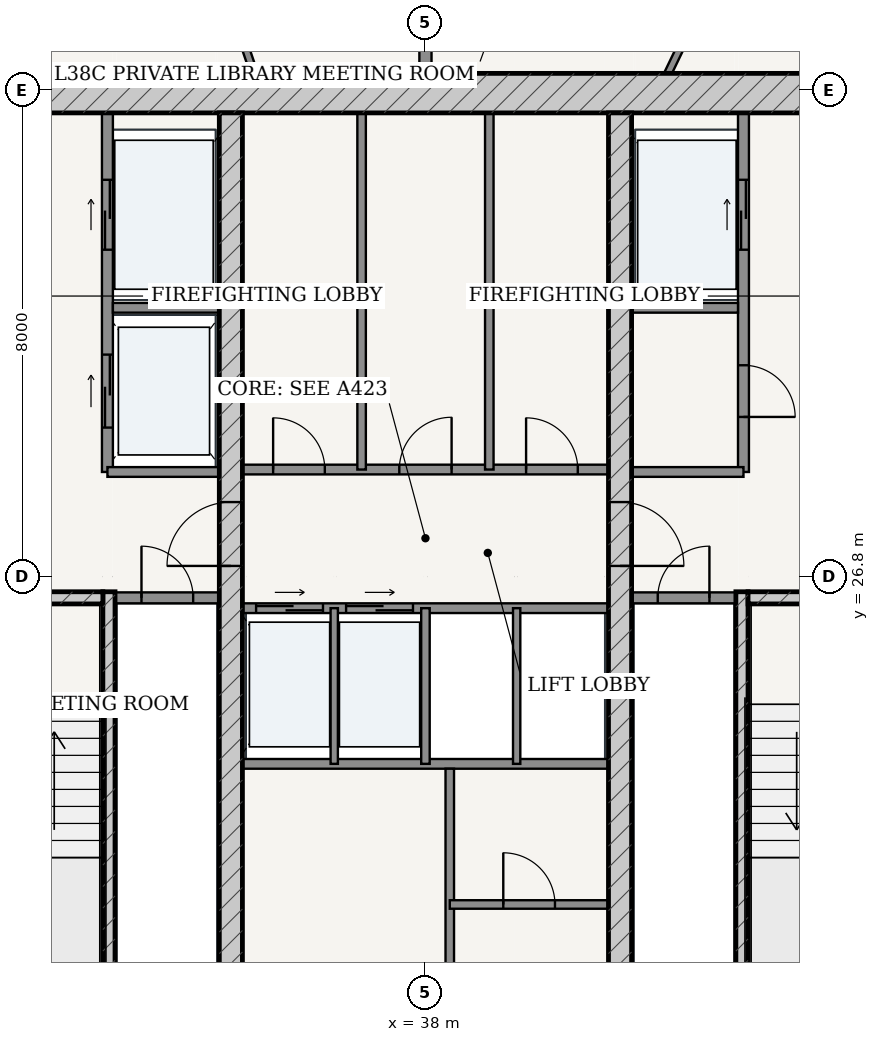
"""IFC4 building model, lengths in metres.
Left out: names, types, materials, properties, quantities, classifications, styles, units other than length and angle.
Written with IfcOpenShell. Run it as: python <this file> out.ifc"""

import sys

from ifc_helpers import new_model, si_unit, direction, frame, frame_2d, origin, place, context, subcontext, project, spatial, rectangle, extrude, source, transform, mapped, element, fill, save


model = new_model("IFC4")
c1 = context("Model", 3, precision=1e-05, world=origin(), true_north=direction((-0.2419218956, 0.970295726276)))
c2 = subcontext(c1, "Body", "Model", "MODEL_VIEW")
j1 = project(units=[si_unit("LENGTHUNIT", "METRE"), si_unit("PLANEANGLEUNIT", "RADIAN")], contexts=[c1])
p1 = place(None, origin())
s1 = spatial("IfcSite", under=j1, at=p1, CompositionType="ELEMENT")
p2 = place(p1, origin())
s2 = spatial("IfcBuilding", under=s1, at=p2, CompositionType="ELEMENT")
p3 = place(p2, frame((0.0, 0.0, 146.2)))
s3 = spatial("IfcBuildingStorey", under=s2, at=p3, CompositionType="ELEMENT", Elevation=146.2)
p4 = place(p3, frame((28.725, 34.75, 0.0), z_axis=(0.0, 0.0, 1.0), x_axis=(1.0, 0.0, 0.0)))
e1 = element("IfcWall", 1, at=p4, inside=s3, PredefinedType="SHEAR", context=c2, shape_type="SweptSolid", body=[
    extrude(rectangle(XDim=18.55, YDim=0.65, at=frame_2d((9.275, 0.0))), origin(), (0.0, 0.0, 1.0), 3.33),
])
p5 = place(p3, frame((32.795, 19.175, 0.0), z_axis=(0.0, 0.0, 1.0), x_axis=(0.0, 1.0, 0.0)))
e2 = element("IfcWall", 2, at=p5, inside=s3, PredefinedType="SOLIDWALL", context=c2, shape_type="SweptSolid", body=[
    extrude(rectangle(XDim=7.375, YDim=0.2, at=frame_2d((3.688, 0.0))), origin(), (0.0, 0.0, 1.0), 3.33),
])
p6 = place(p3, frame((29.375, 26.45, 0.0), z_axis=(0.0, 0.0, 1.0), x_axis=(1.0, 0.0, 0.0)))
e3 = element("IfcWall", 3, at=p6, inside=s3, PredefinedType="SOLIDWALL", context=c2, shape_type="SweptSolid", body=[
    extrude(rectangle(XDim=3.32, YDim=0.2, at=frame_2d((1.66, 0.0))), origin(), (0.0, 0.0, 1.0), 3.33),
])
p7 = place(p6, frame((1.185, 0.0, 0.0)))
e4 = element("IfcOpeningElement", 4, at=p7, cuts=e3, PredefinedType="OPENING", context=c2, shape_type="SweptSolid", body=[
    extrude(rectangle(XDim=0.95, YDim=2.15, at=frame_2d((0.475, 1.075))), frame((0.0, 0.11, 0.0), z_axis=(0.0, -1.0, 0.0), x_axis=(1.0, 0.0, 0.0)), (0.0, 0.0, 1.0), 0.22),
])
p8 = place(p3, frame((43.205, 19.175, 0.0), z_axis=(0.0, 0.0, 1.0), x_axis=(0.0, 1.0, 0.0)))
e5 = element("IfcWall", 5, at=p8, inside=s3, PredefinedType="SOLIDWALL", context=c2, shape_type="SweptSolid", body=[
    extrude(rectangle(XDim=7.375, YDim=0.2, at=frame_2d((3.688, 0.0))), origin(), (0.0, 0.0, 1.0), 3.33),
])
p9 = place(p3, frame((43.305, 26.45, 0.0), z_axis=(0.0, 0.0, 1.0), x_axis=(1.0, 0.0, 0.0)))
e6 = element("IfcWall", 6, at=p9, inside=s3, PredefinedType="SOLIDWALL", context=c2, shape_type="SweptSolid", body=[
    extrude(rectangle(XDim=3.32, YDim=0.2, at=frame_2d((1.66, 0.0))), origin(), (0.0, 0.0, 1.0), 3.33),
])
p10 = place(p9, frame((1.185, 0.0, 0.0)))
e7 = element("IfcOpeningElement", 7, at=p10, cuts=e6, PredefinedType="OPENING", context=c2, shape_type="SweptSolid", body=[
    extrude(rectangle(XDim=0.95, YDim=2.15, at=frame_2d((0.475, 1.075))), frame((0.0, 0.11, 0.0), z_axis=(0.0, -1.0, 0.0), x_axis=(1.0, 0.0, 0.0)), (0.0, 0.0, 1.0), 0.22),
])
p11 = place(p3, frame((34.8, 19.175, 0.0), z_axis=(0.0, 0.0, 1.0), x_axis=(0.0, 1.0, 0.0)))
e8 = element("IfcWall", 8, at=p11, inside=s3, PredefinedType="SHEAR", context=c2, shape_type="SweptSolid", body=[
    extrude(rectangle(XDim=15.25, YDim=0.38, at=frame_2d((7.625, 0.0))), origin(), (0.0, 0.0, 1.0), 3.33),
])
p12 = place(p11, frame((7.8, 0.0, 0.0)))
e9 = element("IfcOpeningElement", 9, at=p12, cuts=e8, PredefinedType="OPENING", context=c2, shape_type="SweptSolid", body=[
    extrude(rectangle(XDim=1.05, YDim=2.15, at=frame_2d((0.525, 1.075))), frame((0.0, 0.2, 0.0), z_axis=(0.0, -1.0, 0.0), x_axis=(1.0, 0.0, 0.0)), (0.0, 0.0, 1.0), 0.4),
])
p13 = place(p3, frame((41.2, 19.175, 0.0), z_axis=(0.0, 0.0, 1.0), x_axis=(0.0, 1.0, 0.0)))
e10 = element("IfcWall", 10, at=p13, inside=s3, PredefinedType="SHEAR", context=c2, shape_type="SweptSolid", body=[
    extrude(rectangle(XDim=15.25, YDim=0.38, at=frame_2d((7.625, 0.0))), origin(), (0.0, 0.0, 1.0), 3.33),
])
p14 = place(p13, frame((7.8, 0.0, 0.0)))
e11 = element("IfcOpeningElement", 11, at=p14, cuts=e10, PredefinedType="OPENING", context=c2, shape_type="SweptSolid", body=[
    extrude(rectangle(XDim=1.05, YDim=2.15, at=frame_2d((0.525, 1.075))), frame((0.0, 0.2, 0.0), z_axis=(0.0, -1.0, 0.0), x_axis=(1.0, 0.0, 0.0)), (0.0, 0.0, 1.0), 0.4),
])
p15 = place(p3, frame((32.9, 26.45, 0.0), z_axis=(0.0, 0.0, 1.0), x_axis=(1.0, 0.0, 0.0)))
e12 = element("IfcWall", 12, at=p15, inside=s3, PredefinedType="PARTITIONING", context=c2, shape_type="SweptSolid", body=[
    extrude(rectangle(XDim=1.71, YDim=0.18, at=frame_2d((0.855, 0.0))), origin(), (0.0, 0.0, 1.0), 3.33),
])
p16 = place(p15, frame((0.43, 0.0, 0.0)))
e13 = element("IfcOpeningElement", 13, at=p16, cuts=e12, PredefinedType="OPENING", context=c2, shape_type="SweptSolid", body=[
    extrude(rectangle(XDim=0.85, YDim=2.1, at=frame_2d((0.425, 1.05))), frame((0.0, 0.1, 0.0), z_axis=(0.0, -1.0, 0.0), x_axis=(1.0, 0.0, 0.0)), (0.0, 0.0, 1.0), 0.2),
])
p17 = place(p3, frame((41.39, 26.45, 0.0), z_axis=(0.0, 0.0, 1.0), x_axis=(1.0, 0.0, 0.0)))
e14 = element("IfcWall", 14, at=p17, inside=s3, PredefinedType="PARTITIONING", context=c2, shape_type="SweptSolid", body=[
    extrude(rectangle(XDim=1.71, YDim=0.18, at=frame_2d((0.855, 0.0))), origin(), (0.0, 0.0, 1.0), 3.33),
])
p18 = place(p17, frame((0.43, 0.0, 0.0)))
e15 = element("IfcOpeningElement", 15, at=p18, cuts=e14, PredefinedType="OPENING", context=c2, shape_type="SweptSolid", body=[
    extrude(rectangle(XDim=0.85, YDim=2.1, at=frame_2d((0.425, 1.05))), frame((0.0, 0.1, 0.0), z_axis=(0.0, -1.0, 0.0), x_axis=(1.0, 0.0, 0.0)), (0.0, 0.0, 1.0), 0.2),
])
p19 = place(p3, frame((32.77, 28.52, 0.0), z_axis=(0.0, 0.0, 1.0), x_axis=(0.0, 1.0, 0.0)))
e16 = element("IfcWall", 16, at=p19, inside=s3, PredefinedType="PARTITIONING", context=c2, shape_type="SweptSolid", body=[
    extrude(rectangle(XDim=5.905, YDim=0.18, at=frame_2d((2.953, 0.0))), origin(), (0.0, 0.0, 1.0), 3.33),
])
p20 = place(p19, frame((3.655, 0.0, 0.0)))
e17 = element("IfcOpeningElement", 17, at=p20, cuts=e16, PredefinedType="OPENING", context=c2, shape_type="SweptSolid", body=[
    extrude(rectangle(XDim=1.15, YDim=2.2, at=frame_2d((0.575, 1.1))), frame((0.0, 0.1, 0.0), z_axis=(0.0, -1.0, 0.0), x_axis=(1.0, 0.0, 0.0)), (0.0, 0.0, 1.0), 0.2),
])
p21 = place(p19, frame((0.73, 0.0, 0.0)))
e18 = element("IfcOpeningElement", 18, at=p21, cuts=e16, PredefinedType="OPENING", context=c2, shape_type="SweptSolid", body=[
    extrude(rectangle(XDim=1.2, YDim=2.25, at=frame_2d((0.6, 1.125))), frame((0.0, 0.1, 0.0), z_axis=(0.0, -1.0, 0.0), x_axis=(1.0, 0.0, 0.0)), (0.0, 0.0, 1.0), 0.2),
])
p22 = place(p3, frame((32.86, 31.22, 0.0), z_axis=(0.0, 0.0, 1.0), x_axis=(1.0, 0.0, 0.0)))
e19 = element("IfcWall", 19, at=p22, inside=s3, PredefinedType="PARTITIONING", context=c2, shape_type="SweptSolid", body=[
    extrude(rectangle(XDim=1.75, YDim=0.16, at=frame_2d((0.875, 0.0))), origin(), (0.0, 0.0, 1.0), 3.33),
])
p23 = place(p3, frame((32.77, 28.52, 0.0), z_axis=(0.0, 0.0, 1.0), x_axis=(1.0, 0.0, 0.0)))
e20 = element("IfcWall", 20, at=p23, inside=s3, PredefinedType="PARTITIONING", context=c2, shape_type="SweptSolid", body=[
    extrude(rectangle(XDim=1.84, YDim=0.16, at=frame_2d((0.92, 0.0))), origin(), (0.0, 0.0, 1.0), 3.33),
])
p24 = place(p3, frame((43.23, 28.52, 0.0), z_axis=(0.0, 0.0, 1.0), x_axis=(0.0, 1.0, 0.0)))
e21 = element("IfcWall", 21, at=p24, inside=s3, PredefinedType="PARTITIONING", context=c2, shape_type="SweptSolid", body=[
    extrude(rectangle(XDim=5.905, YDim=0.18, at=frame_2d((2.953, 0.0))), origin(), (0.0, 0.0, 1.0), 3.33),
])
p25 = place(p24, frame((0.905, 0.0, 0.0)))
e22 = element("IfcOpeningElement", 22, at=p25, cuts=e21, PredefinedType="OPENING", context=c2, shape_type="SweptSolid", body=[
    extrude(rectangle(XDim=0.85, YDim=2.1, at=frame_2d((0.425, 1.05))), frame((0.0, 0.1, 0.0), z_axis=(0.0, -1.0, 0.0), x_axis=(1.0, 0.0, 0.0)), (0.0, 0.0, 1.0), 0.2),
])
p26 = place(p24, frame((3.655, 0.0, 0.0)))
e23 = element("IfcOpeningElement", 23, at=p26, cuts=e21, PredefinedType="OPENING", context=c2, shape_type="SweptSolid", body=[
    extrude(rectangle(XDim=1.15, YDim=2.2, at=frame_2d((0.575, 1.1))), frame((0.0, 0.1, 0.0), z_axis=(0.0, -1.0, 0.0), x_axis=(1.0, 0.0, 0.0)), (0.0, 0.0, 1.0), 0.2),
])
p27 = place(p3, frame((41.39, 31.22, 0.0), z_axis=(0.0, 0.0, 1.0), x_axis=(1.0, 0.0, 0.0)))
e24 = element("IfcWall", 24, at=p27, inside=s3, PredefinedType="PARTITIONING", context=c2, shape_type="SweptSolid", body=[
    extrude(rectangle(XDim=1.75, YDim=0.16, at=frame_2d((0.875, 0.0))), origin(), (0.0, 0.0, 1.0), 3.33),
])
p28 = place(p3, frame((41.39, 28.52, 0.0), z_axis=(0.0, 0.0, 1.0), x_axis=(1.0, 0.0, 0.0)))
e25 = element("IfcWall", 25, at=p28, inside=s3, PredefinedType="PARTITIONING", context=c2, shape_type="SweptSolid", body=[
    extrude(rectangle(XDim=1.84, YDim=0.16, at=frame_2d((0.92, 0.0))), origin(), (0.0, 0.0, 1.0), 3.33),
])
p29 = place(p3, frame((34.99, 28.56, 0.0), z_axis=(0.0, 0.0, 1.0), x_axis=(1.0, 0.0, 0.0)))
e26 = element("IfcWall", 26, at=p29, inside=s3, PredefinedType="PARTITIONING", context=c2, shape_type="SweptSolid", body=[
    extrude(rectangle(XDim=6.02, YDim=0.16, at=frame_2d((3.01, 0.0))), origin(), (0.0, 0.0, 1.0), 3.33),
])
p30 = place(p29, frame((0.505, 0.0, 0.0)))
e27 = element("IfcOpeningElement", 27, at=p30, cuts=e26, PredefinedType="OPENING", context=c2, shape_type="SweptSolid", body=[
    extrude(rectangle(XDim=0.85, YDim=2.1, at=frame_2d((0.425, 1.05))), frame((0.0, 0.09, 0.0), z_axis=(0.0, -1.0, 0.0), x_axis=(1.0, 0.0, 0.0)), (0.0, 0.0, 1.0), 0.18),
])
p31 = place(p29, frame((2.58, 0.0, 0.0)))
e28 = element("IfcOpeningElement", 28, at=p31, cuts=e26, PredefinedType="OPENING", context=c2, shape_type="SweptSolid", body=[
    extrude(rectangle(XDim=0.86, YDim=2.1, at=frame_2d((0.43, 1.05))), frame((0.0, 0.09, 0.0), z_axis=(0.0, -1.0, 0.0), x_axis=(1.0, 0.0, 0.0)), (0.0, 0.0, 1.0), 0.18),
])
p32 = place(p29, frame((4.665, 0.0, 0.0)))
e29 = element("IfcOpeningElement", 29, at=p32, cuts=e26, PredefinedType="OPENING", context=c2, shape_type="SweptSolid", body=[
    extrude(rectangle(XDim=0.85, YDim=2.1, at=frame_2d((0.425, 1.05))), frame((0.0, 0.09, 0.0), z_axis=(0.0, -1.0, 0.0), x_axis=(1.0, 0.0, 0.0)), (0.0, 0.0, 1.0), 0.18),
])
for number, where, z_axis, x_axis in (
    (30, (36.95, 28.56, 0.0), (0.0, 0.0, 1.0), (0.0, 1.0, 0.0)),
    (31, (39.05, 28.56, 0.0), (0.0, 0.0, 1.0), (0.0, 1.0, 0.0)),
):
    element("IfcWall", number, at=place(p3, frame(where, z_axis=z_axis, x_axis=x_axis)), inside=s3, PredefinedType="PARTITIONING", context=c2, shape_type="SweptSolid", body=[
        extrude(rectangle(XDim=5.865, YDim=0.14, at=frame_2d((2.933, 0.0))), origin(), (0.0, 0.0, 1.0), 3.33),
    ])
p33 = place(p3, frame((34.99, 26.28, 0.0), z_axis=(0.0, 0.0, 1.0), x_axis=(1.0, 0.0, 0.0)))
e32 = element("IfcWall", 32, at=p33, inside=s3, PredefinedType="PARTITIONING", context=c2, shape_type="SweptSolid", body=[
    extrude(rectangle(XDim=6.02, YDim=0.16, at=frame_2d((3.01, 0.0))), origin(), (0.0, 0.0, 1.0), 3.33),
])
p34 = place(p33, frame((0.225, 0.0, 0.0)))
e33 = element("IfcOpeningElement", 33, at=p34, cuts=e32, PredefinedType="OPENING", context=c2, shape_type="SweptSolid", body=[
    extrude(rectangle(XDim=1.1, YDim=2.2, at=frame_2d((0.55, 1.1))), frame((0.0, 0.09, 0.0), z_axis=(0.0, -1.0, 0.0), x_axis=(1.0, 0.0, 0.0)), (0.0, 0.0, 1.0), 0.18),
])
p35 = place(p33, frame((1.705, 0.0, 0.0)))
e34 = element("IfcOpeningElement", 34, at=p35, cuts=e32, PredefinedType="OPENING", context=c2, shape_type="SweptSolid", body=[
    extrude(rectangle(XDim=1.1, YDim=2.2, at=frame_2d((0.55, 1.1))), frame((0.0, 0.09, 0.0), z_axis=(0.0, -1.0, 0.0), x_axis=(1.0, 0.0, 0.0)), (0.0, 0.0, 1.0), 0.18),
])
p36 = place(p3, frame((34.99, 23.72, 0.0), z_axis=(0.0, 0.0, 1.0), x_axis=(1.0, 0.0, 0.0)))
e35 = element("IfcWall", 35, at=p36, inside=s3, PredefinedType="PARTITIONING", context=c2, shape_type="SweptSolid", body=[
    extrude(rectangle(XDim=6.02, YDim=0.16, at=frame_2d((3.01, 0.0))), origin(), (0.0, 0.0, 1.0), 3.33),
])
p37 = place(p3, frame((36.5, 23.72, 0.0), z_axis=(0.0, 0.0, 1.0), x_axis=(0.0, 1.0, 0.0)))
e36 = element("IfcWall", 36, at=p37, inside=s3, PredefinedType="PARTITIONING", context=c2, shape_type="SweptSolid", body=[
    extrude(rectangle(XDim=2.56, YDim=0.12, at=frame_2d((1.28, 0.0))), origin(), (0.0, 0.0, 1.0), 3.33),
])
p38 = place(p3, frame((38.0, 23.72, 0.0), z_axis=(0.0, 0.0, 1.0), x_axis=(0.0, 1.0, 0.0)))
e37 = element("IfcWall", 37, at=p38, inside=s3, PredefinedType="PARTITIONING", context=c2, shape_type="SweptSolid", body=[
    extrude(rectangle(XDim=2.56, YDim=0.14, at=frame_2d((1.28, 0.0))), origin(), (0.0, 0.0, 1.0), 3.33),
])
p39 = place(p3, frame((39.5, 23.72, 0.0), z_axis=(0.0, 0.0, 1.0), x_axis=(0.0, 1.0, 0.0)))
e38 = element("IfcWall", 38, at=p39, inside=s3, PredefinedType="PARTITIONING", context=c2, shape_type="SweptSolid", body=[
    extrude(rectangle(XDim=2.56, YDim=0.12, at=frame_2d((1.28, 0.0))), origin(), (0.0, 0.0, 1.0), 3.33),
])
p40 = place(p3, frame((38.4, 19.175, 0.0), z_axis=(0.0, 0.0, 1.0), x_axis=(0.0, 1.0, 0.0)))
e39 = element("IfcWall", 39, at=p40, inside=s3, PredefinedType="PARTITIONING", context=c2, shape_type="SweptSolid", body=[
    extrude(rectangle(XDim=4.465, YDim=0.14, at=frame_2d((2.232, 0.0))), origin(), (0.0, 0.0, 1.0), 3.33),
])
p41 = place(p3, frame((38.4, 21.407, 0.0), z_axis=(0.0, 0.0, 1.0), x_axis=(1.0, 0.0, 0.0)))
e40 = element("IfcWall", 40, at=p41, inside=s3, PredefinedType="PARTITIONING", context=c2, shape_type="SweptSolid", body=[
    extrude(rectangle(XDim=2.61, YDim=0.14, at=frame_2d((1.305, 0.0))), origin(), (0.0, 0.0, 1.0), 3.33),
])
p42 = place(p41, frame((0.88, 0.0, 0.0)))
e41 = element("IfcOpeningElement", 41, at=p42, cuts=e40, PredefinedType="OPENING", context=c2, shape_type="SweptSolid", body=[
    extrude(rectangle(XDim=0.85, YDim=2.1, at=frame_2d((0.425, 1.05))), frame((0.0, 0.08, 0.0), z_axis=(0.0, -1.0, 0.0), x_axis=(1.0, 0.0, 0.0)), (0.0, 0.0, 1.0), 0.16),
])
p43 = place(p3, frame((38.0, 35.075, 0.0), z_axis=(0.0, 0.0, 1.0), x_axis=(0.0, 1.0, 0.0)))
e42 = element("IfcWall", 42, at=p43, inside=s3, PredefinedType="PARTITIONING", context=c2, shape_type="SweptSolid", body=[
    extrude(rectangle(XDim=12.465, YDim=0.2, at=frame_2d((6.232, 0.0))), origin(), (0.0, 0.0, 1.0), 2.415),
])
p44 = place(p3, frame((35.182, 35.075, 0.0), z_axis=(0.0, 0.0, 1.0), x_axis=(-0.322321614946, 0.946630221649, 0.0)))
e43 = element("IfcWall", 43, at=p44, inside=s3, PredefinedType="PARTITIONING", context=c2, shape_type="SweptSolid", body=[
    extrude(rectangle(XDim=2.737, YDim=0.12, at=frame_2d((1.369, 0.0))), origin(), (0.0, 0.0, 1.0), 2.415),
])
p45 = place(p3, frame((41.988, 35.075, 0.0), z_axis=(0.0, 0.0, 1.0), x_axis=(0.434144408634, 0.900843289619, 0.0)))
e44 = element("IfcWall", 44, at=p45, inside=s3, PredefinedType="PARTITIONING", context=c2, shape_type="SweptSolid", body=[
    extrude(rectangle(XDim=2.88, YDim=0.12, at=frame_2d((1.44, 0.0))), origin(), (0.0, 0.0, 1.0), 3.33),
])
m1 = source(origin(), c2, "Body", "SweptSolid", [
    extrude(rectangle(XDim=1.05, YDim=2.15, at=frame_2d((0.525, 1.075))), frame((0.0, 0.025, 0.0), z_axis=(0.0, -1.0, 0.0), x_axis=(1.0, 0.0, 0.0)), (0.0, 0.0, 1.0), 0.05),
])
p46 = place(p12, origin())
e45 = element("IfcDoor", 45, at=p46, inside=s3, OperationType="SINGLE_SWING_LEFT", PredefinedType="DOOR", context=c2, shape_type="MappedRepresentation", body=[
    mapped(m1, transform((0.0, 0.0, 0.0), scale=1.0)),
])
fill(e9, e45)
p47 = place(p14, frame((1.05, 0.0, 0.0), z_axis=(0.0, 0.0, 1.0), x_axis=(-1.0, 0.0, 0.0)))
e46 = element("IfcDoor", 46, at=p47, inside=s3, OperationType="SINGLE_SWING_RIGHT", PredefinedType="DOOR", context=c2, shape_type="MappedRepresentation", body=[
    mapped(m1, transform((0.0, 0.0, 0.0), scale=1.0)),
])
fill(e11, e46)
m2 = source(origin(), c2, "Body", "SweptSolid", [
    extrude(rectangle(XDim=0.85, YDim=2.1, at=frame_2d((0.425, 1.05))), frame((0.0, 0.025, 0.0), z_axis=(0.0, -1.0, 0.0), x_axis=(1.0, 0.0, 0.0)), (0.0, 0.0, 1.0), 0.05),
])
p48 = place(p16, origin())
e47 = element("IfcDoor", 47, at=p48, inside=s3, OperationType="SINGLE_SWING_LEFT", PredefinedType="DOOR", context=c2, shape_type="MappedRepresentation", body=[
    mapped(m2, transform((0.0, 0.0, 0.0), scale=1.0)),
])
fill(e13, e47)
p49 = place(p18, origin())
e48 = element("IfcDoor", 48, at=p49, inside=s3, OperationType="SINGLE_SWING_RIGHT", PredefinedType="DOOR", context=c2, shape_type="MappedRepresentation", body=[
    mapped(m2, transform((0.0, 0.0, 0.0), scale=1.0)),
])
fill(e15, e48)
p50 = place(p25, frame((0.85, 0.0, 0.0), z_axis=(0.0, 0.0, 1.0), x_axis=(-1.0, 0.0, 0.0)))
e49 = element("IfcDoor", 49, at=p50, inside=s3, OperationType="SINGLE_SWING_RIGHT", PredefinedType="DOOR", context=c2, shape_type="MappedRepresentation", body=[
    mapped(m2, transform((0.0, 0.0, 0.0), scale=1.0)),
])
fill(e22, e49)
p51 = place(p30, origin())
e50 = element("IfcDoor", 50, at=p51, inside=s3, OperationType="SINGLE_SWING_LEFT", PredefinedType="DOOR", context=c2, shape_type="MappedRepresentation", body=[
    mapped(m2, transform((0.0, 0.0, 0.0), scale=1.0)),
])
fill(e27, e50)
m3 = source(origin(), c2, "Body", "SweptSolid", [
    extrude(rectangle(XDim=0.86, YDim=2.1, at=frame_2d((0.43, 1.05))), frame((0.0, 0.025, 0.0), z_axis=(0.0, -1.0, 0.0), x_axis=(1.0, 0.0, 0.0)), (0.0, 0.0, 1.0), 0.05),
])
p52 = place(p31, origin())
e51 = element("IfcDoor", 51, at=p52, inside=s3, OperationType="SINGLE_SWING_RIGHT", PredefinedType="DOOR", context=c2, shape_type="MappedRepresentation", body=[
    mapped(m3, transform((0.0, 0.0, 0.0), scale=1.0)),
])
fill(e28, e51)
p53 = place(p32, origin())
e52 = element("IfcDoor", 52, at=p53, inside=s3, OperationType="SINGLE_SWING_LEFT", PredefinedType="DOOR", context=c2, shape_type="MappedRepresentation", body=[
    mapped(m2, transform((0.0, 0.0, 0.0), scale=1.0)),
])
fill(e29, e52)
p54 = place(p42, origin())
e53 = element("IfcDoor", 53, at=p54, inside=s3, OperationType="SINGLE_SWING_LEFT", PredefinedType="DOOR", context=c2, shape_type="MappedRepresentation", body=[
    mapped(m2, transform((0.0, 0.0, 0.0), scale=1.0)),
])
fill(e41, e53)
m4 = source(origin(), c2, "Body", "SweptSolid", [
    extrude(rectangle(XDim=1.15, YDim=2.2, at=frame_2d((0.575, 1.1))), frame((0.0, 0.025, 0.0), z_axis=(0.0, -1.0, 0.0), x_axis=(1.0, 0.0, 0.0)), (0.0, 0.0, 1.0), 0.05),
])
p55 = place(p20, origin())
e54 = element("IfcDoor", 54, at=p55, inside=s3, OperationType="DOUBLE_DOOR_SLIDING", PredefinedType="DOOR", context=c2, shape_type="MappedRepresentation", body=[
    mapped(m4, transform((0.0, 0.0, 0.0), scale=1.0)),
])
fill(e17, e54)
p56 = place(p26, origin())
e55 = element("IfcDoor", 55, at=p56, inside=s3, OperationType="DOUBLE_DOOR_SLIDING", PredefinedType="DOOR", context=c2, shape_type="MappedRepresentation", body=[
    mapped(m4, transform((0.0, 0.0, 0.0), scale=1.0)),
])
fill(e23, e55)
m5 = source(origin(), c2, "Body", "SweptSolid", [
    extrude(rectangle(XDim=1.2, YDim=2.25, at=frame_2d((0.6, 1.125))), frame((0.0, 0.025, 0.0), z_axis=(0.0, -1.0, 0.0), x_axis=(1.0, 0.0, 0.0)), (0.0, 0.0, 1.0), 0.05),
])
p57 = place(p21, origin())
e56 = element("IfcDoor", 56, at=p57, inside=s3, OperationType="DOUBLE_DOOR_SLIDING", PredefinedType="DOOR", context=c2, shape_type="MappedRepresentation", body=[
    mapped(m5, transform((0.0, 0.0, 0.0), scale=1.0)),
])
fill(e18, e56)
m6 = source(origin(), c2, "Body", "SweptSolid", [
    extrude(rectangle(XDim=1.1, YDim=2.2, at=frame_2d((0.55, 1.1))), frame((0.0, 0.025, 0.0), z_axis=(0.0, -1.0, 0.0), x_axis=(1.0, 0.0, 0.0)), (0.0, 0.0, 1.0), 0.05),
])
p58 = place(p34, origin())
e57 = element("IfcDoor", 57, at=p58, inside=s3, OperationType="DOUBLE_DOOR_SLIDING", PredefinedType="DOOR", context=c2, shape_type="MappedRepresentation", body=[
    mapped(m6, transform((0.0, 0.0, 0.0), scale=1.0)),
])
fill(e33, e57)
p59 = place(p35, origin())
e58 = element("IfcDoor", 58, at=p59, inside=s3, OperationType="DOUBLE_DOOR_SLIDING", PredefinedType="DOOR", context=c2, shape_type="MappedRepresentation", body=[
    mapped(m6, transform((0.0, 0.0, 0.0), scale=1.0)),
])
fill(e34, e58)
save(model, sys.argv[1])
